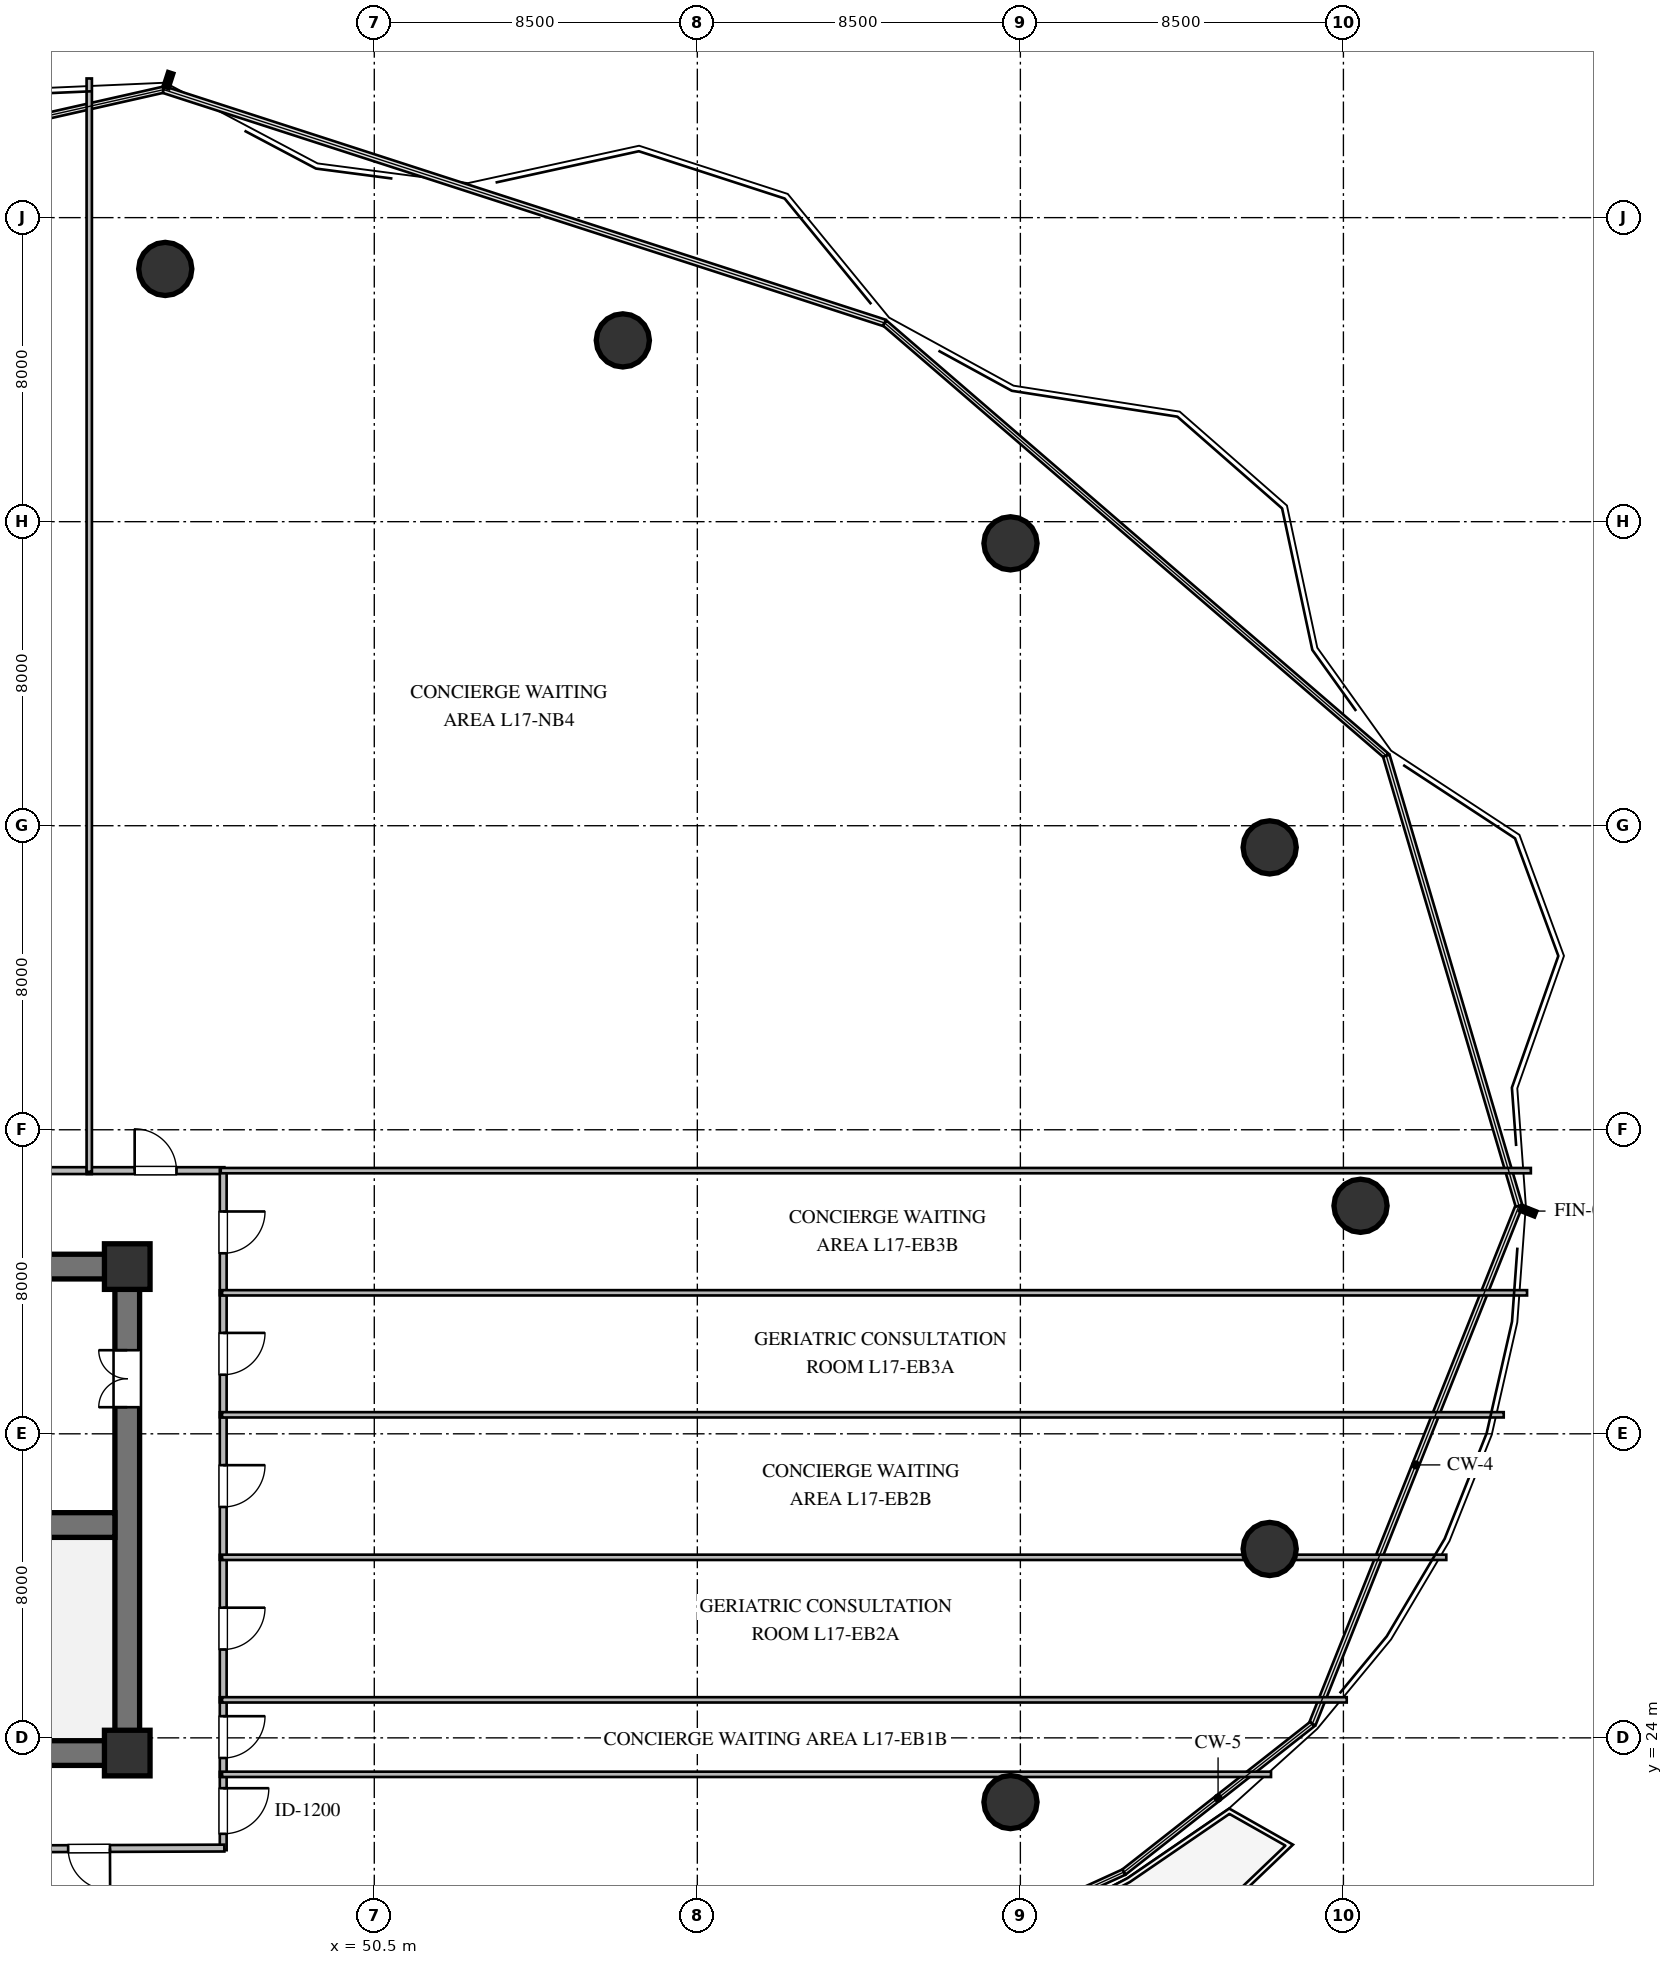
"""IFC4 building model, lengths in metres.
Left out: names, types, materials, properties, quantities, classifications, styles, units other than length and angle.
Written with IfcOpenShell. Run it as: python <this file> out.ifc"""

import sys

from ifc_helpers import new_model, si_unit, direction, frame, frame_2d, origin, origin_2d, place, context, subcontext, project, spatial, rectangle, circle, extrude, element, fill, save


model = new_model("IFC4")
c1 = context("Model", 3, precision=1e-05, world=origin(), true_north=direction((0.0, 1.0)))
c2 = subcontext(c1, "Body", "Model", "MODEL_VIEW")
j1 = project(units=[si_unit("LENGTHUNIT", "METRE"), si_unit("PLANEANGLEUNIT", "RADIAN")], contexts=[c1])
p1 = place(None, origin())
s1 = spatial("IfcSite", under=j1, at=p1, CompositionType="ELEMENT")
p2 = place(p1, origin())
s2 = spatial("IfcBuilding", under=s1, at=p2, CompositionType="ELEMENT")
p3 = place(p2, frame((0.0, 0.0, 67.2)))
s3 = spatial("IfcBuildingStorey", under=s2, at=p3, CompositionType="ELEMENT", Elevation=67.2)
for number, where, z_axis, x_axis in (
    (1, (21.675, 23.6, 0.0), (0.0, 0.0, 1.0), (1.0, 0.0, 0.0)),
    (2, (21.675, 36.4, 0.0), (0.0, 0.0, 1.0), (1.0, 0.0, 0.0)),
):
    element("IfcWall", number, at=place(p3, frame(where, z_axis=z_axis, x_axis=x_axis)), inside=s3, PredefinedType="SHEAR", context=c2, shape_type="SweptSolid", body=[
        extrude(rectangle(XDim=22.65, YDim=0.65, at=frame_2d((11.325, 0.0))), origin(), (0.0, 0.0, 1.0), 3.36),
    ])
p4 = place(p3, frame((44.0, 23.925, 0.0), z_axis=(0.0, 0.0, 1.0), x_axis=(0.0, 1.0, 0.0)))
e3 = element("IfcWall", 3, at=p4, inside=s3, PredefinedType="SHEAR", context=c2, shape_type="SweptSolid", body=[
    extrude(rectangle(XDim=12.15, YDim=0.65, at=frame_2d((6.075, 0.0))), origin(), (0.0, 0.0, 1.0), 3.36),
])
p5 = place(p4, frame((8.775, 0.0, 0.0)))
e4 = element("IfcOpeningElement", 4, at=p5, cuts=e3, PredefinedType="OPENING", context=c2, shape_type="SweptSolid", body=[
    extrude(rectangle(XDim=1.5, YDim=2.15, at=frame_2d((0.75, 1.075))), frame((0.0, 0.335, 0.0), z_axis=(0.0, -1.0, 0.0), x_axis=(1.0, 0.0, 0.0)), (0.0, 0.0, 1.0), 0.67),
])
p6 = place(p3, frame((22.325, 29.6, 0.0), z_axis=(0.0, 0.0, 1.0), x_axis=(1.0, 0.0, 0.0)))
e5 = element("IfcWall", 5, at=p6, inside=s3, PredefinedType="SHEAR", context=c2, shape_type="SweptSolid", body=[
    extrude(rectangle(XDim=21.35, YDim=0.65, at=frame_2d((10.675, 0.0))), origin(), (0.0, 0.0, 1.0), 3.36),
])
p7 = place(p6, frame((12.125, 0.0, 0.0)))
e6 = element("IfcOpeningElement", 6, at=p7, cuts=e5, PredefinedType="OPENING", context=c2, shape_type="SweptSolid", body=[
    extrude(rectangle(XDim=1.15, YDim=2.1, at=frame_2d((0.575, 1.05))), frame((0.0, 0.335, 0.0), z_axis=(0.0, -1.0, 0.0), x_axis=(1.0, 0.0, 0.0)), (0.0, 0.0, 1.0), 0.67),
])
for number, where, z_axis, x_axis in (
    (7, (44.0, 23.6, 0.0), (0.0, 0.0, 1.0), (1.0, 0.0, 0.0)),
    (8, (44.0, 36.4, 0.0), (0.0, 0.0, 1.0), (1.0, 0.0, 0.0)),
):
    element("IfcColumn", number, at=place(p3, frame(where, z_axis=z_axis, x_axis=x_axis)), inside=s3, PredefinedType="COLUMN", context=c2, shape_type="SweptSolid", body=[
        extrude(rectangle(XDim=1.2, YDim=1.2, at=origin_2d()), origin(), (0.0, 0.0, 1.0), 3.6),
    ])
for number, where, z_axis, x_axis in (
    (9, (76.45, 38.0, 0.0), (0.0, 0.0, 1.0), (1.0, 0.0, 0.0)),
    (10, (74.06, 47.43, 0.0), (0.0, 0.0, 1.0), (1.0, 0.0, 0.0)),
    (11, (67.24, 55.43, 0.0), (0.0, 0.0, 1.0), (1.0, 0.0, 0.0)),
    (12, (57.04, 60.77, 0.0), (0.0, 0.0, 1.0), (1.0, 0.0, 0.0)),
    (13, (45.0, 62.65, 0.0), (0.0, 0.0, 1.0), (1.0, 0.0, 0.0)),
    (14, (67.24, 22.31, 0.0), (0.0, 0.0, 1.0), (1.0, 0.0, 0.0)),
    (15, (74.06, 28.97, 0.0), (0.0, 0.0, 1.0), (1.0, 0.0, 0.0)),
):
    element("IfcColumn", number, at=place(p3, frame(where, z_axis=z_axis, x_axis=x_axis)), inside=s3, PredefinedType="COLUMN", context=c2, shape_type="SweptSolid", body=[
        extrude(circle(Radius=0.7, at=origin_2d()), origin(), (0.0, 0.0, 1.0), 3.6),
    ])
p8 = place(p3, frame((37.935, 38.925, 0.0), z_axis=(0.0, 0.0, 1.0), x_axis=(1.0, 0.0, 0.0)))
e16 = element("IfcWall", 16, at=p8, inside=s3, PredefinedType="PARTITIONING", context=c2, shape_type="SweptSolid", body=[
    extrude(rectangle(XDim=5.13, YDim=0.18, at=frame_2d((2.565, 0.0))), origin(), (0.0, 0.0, 1.0), 3.36),
])
p9 = place(p8, frame((2.015, 0.0, 0.0)))
e17 = element("IfcOpeningElement", 17, at=p9, cuts=e16, PredefinedType="OPENING", context=c2, shape_type="SweptSolid", body=[
    extrude(rectangle(XDim=1.1, YDim=2.1, at=frame_2d((0.55, 1.05))), frame((0.0, 0.1, 0.0), z_axis=(0.0, -1.0, 0.0), x_axis=(1.0, 0.0, 0.0)), (0.0, 0.0, 1.0), 0.2),
])
p10 = place(p3, frame((42.935, 38.925, 0.0), z_axis=(0.0, 0.0, 1.0), x_axis=(1.0, 0.0, 0.0)))
e18 = element("IfcWall", 18, at=p10, inside=s3, PredefinedType="PARTITIONING", context=c2, shape_type="SweptSolid", body=[
    extrude(rectangle(XDim=3.62, YDim=0.18, at=frame_2d((1.81, 0.0))), origin(), (0.0, 0.0, 1.0), 3.36),
])
p11 = place(p10, frame((1.26, 0.0, 0.0)))
e19 = element("IfcOpeningElement", 19, at=p11, cuts=e18, PredefinedType="OPENING", context=c2, shape_type="SweptSolid", body=[
    extrude(rectangle(XDim=1.1, YDim=2.1, at=frame_2d((0.55, 1.05))), frame((0.0, 0.1, 0.0), z_axis=(0.0, -1.0, 0.0), x_axis=(1.0, 0.0, 0.0)), (0.0, 0.0, 1.0), 0.2),
])
p12 = place(p3, frame((46.525, 23.105, 0.0), z_axis=(0.0, 0.0, 1.0), x_axis=(0.0, -1.0, 0.0)))
e20 = element("IfcWall", 20, at=p12, inside=s3, PredefinedType="PARTITIONING", context=c2, shape_type="SweptSolid", body=[
    extrude(rectangle(XDim=2.06, YDim=0.18, at=frame_2d((1.03, 0.0))), origin(), (0.0, 0.0, 1.0), 3.36),
])
p13 = place(p12, frame((0.43, 0.0, 0.0)))
e21 = element("IfcOpeningElement", 21, at=p13, cuts=e20, PredefinedType="OPENING", context=c2, shape_type="SweptSolid", body=[
    extrude(rectangle(XDim=1.2, YDim=2.15, at=frame_2d((0.6, 1.075))), frame((0.0, 0.1, 0.0), z_axis=(0.0, -1.0, 0.0), x_axis=(1.0, 0.0, 0.0)), (0.0, 0.0, 1.0), 0.2),
])
p14 = place(p3, frame((46.525, 25.065, 0.0), z_axis=(0.0, 0.0, 1.0), x_axis=(0.0, -1.0, 0.0)))
e22 = element("IfcWall", 22, at=p14, inside=s3, PredefinedType="PARTITIONING", context=c2, shape_type="SweptSolid", body=[
    extrude(rectangle(XDim=2.09, YDim=0.18, at=frame_2d((1.045, 0.0))), origin(), (0.0, 0.0, 1.0), 3.36),
])
p15 = place(p14, frame((0.495, 0.0, 0.0)))
e23 = element("IfcOpeningElement", 23, at=p15, cuts=e22, PredefinedType="OPENING", context=c2, shape_type="SweptSolid", body=[
    extrude(rectangle(XDim=1.1, YDim=2.1, at=frame_2d((0.55, 1.05))), frame((0.0, 0.1, 0.0), z_axis=(0.0, -1.0, 0.0), x_axis=(1.0, 0.0, 0.0)), (0.0, 0.0, 1.0), 0.2),
])
p16 = place(p3, frame((46.525, 28.815, 0.0), z_axis=(0.0, 0.0, 1.0), x_axis=(0.0, -1.0, 0.0)))
e24 = element("IfcWall", 24, at=p16, inside=s3, PredefinedType="PARTITIONING", context=c2, shape_type="SweptSolid", body=[
    extrude(rectangle(XDim=3.88, YDim=0.18, at=frame_2d((1.94, 0.0))), origin(), (0.0, 0.0, 1.0), 3.36),
])
p17 = place(p16, frame((1.39, 0.0, 0.0)))
e25 = element("IfcOpeningElement", 25, at=p17, cuts=e24, PredefinedType="OPENING", context=c2, shape_type="SweptSolid", body=[
    extrude(rectangle(XDim=1.1, YDim=2.1, at=frame_2d((0.55, 1.05))), frame((0.0, 0.1, 0.0), z_axis=(0.0, -1.0, 0.0), x_axis=(1.0, 0.0, 0.0)), (0.0, 0.0, 1.0), 0.2),
])
p18 = place(p3, frame((46.525, 32.565, 0.0), z_axis=(0.0, 0.0, 1.0), x_axis=(0.0, -1.0, 0.0)))
e26 = element("IfcWall", 26, at=p18, inside=s3, PredefinedType="PARTITIONING", context=c2, shape_type="SweptSolid", body=[
    extrude(rectangle(XDim=3.88, YDim=0.18, at=frame_2d((1.94, 0.0))), origin(), (0.0, 0.0, 1.0), 3.36),
])
p19 = place(p18, frame((1.39, 0.0, 0.0)))
e27 = element("IfcOpeningElement", 27, at=p19, cuts=e26, PredefinedType="OPENING", context=c2, shape_type="SweptSolid", body=[
    extrude(rectangle(XDim=1.1, YDim=2.1, at=frame_2d((0.55, 1.05))), frame((0.0, 0.1, 0.0), z_axis=(0.0, -1.0, 0.0), x_axis=(1.0, 0.0, 0.0)), (0.0, 0.0, 1.0), 0.2),
])
p20 = place(p3, frame((46.525, 35.775, 0.0), z_axis=(0.0, 0.0, 1.0), x_axis=(0.0, -1.0, 0.0)))
e28 = element("IfcWall", 28, at=p20, inside=s3, PredefinedType="PARTITIONING", context=c2, shape_type="SweptSolid", body=[
    extrude(rectangle(XDim=3.34, YDim=0.18, at=frame_2d((1.67, 0.0))), origin(), (0.0, 0.0, 1.0), 3.36),
])
p21 = place(p20, frame((1.12, 0.0, 0.0)))
e29 = element("IfcOpeningElement", 29, at=p21, cuts=e28, PredefinedType="OPENING", context=c2, shape_type="SweptSolid", body=[
    extrude(rectangle(XDim=1.1, YDim=2.1, at=frame_2d((0.55, 1.05))), frame((0.0, 0.1, 0.0), z_axis=(0.0, -1.0, 0.0), x_axis=(1.0, 0.0, 0.0)), (0.0, 0.0, 1.0), 0.2),
])
p22 = place(p3, frame((46.525, 38.955, 0.0), z_axis=(0.0, 0.0, 1.0), x_axis=(0.0, -1.0, 0.0)))
e30 = element("IfcWall", 30, at=p22, inside=s3, PredefinedType="PARTITIONING", context=c2, shape_type="SweptSolid", body=[
    extrude(rectangle(XDim=3.31, YDim=0.18, at=frame_2d((1.655, 0.0))), origin(), (0.0, 0.0, 1.0), 3.36),
])
p23 = place(p22, frame((1.105, 0.0, 0.0)))
e31 = element("IfcOpeningElement", 31, at=p23, cuts=e30, PredefinedType="OPENING", context=c2, shape_type="SweptSolid", body=[
    extrude(rectangle(XDim=1.1, YDim=2.1, at=frame_2d((0.55, 1.05))), frame((0.0, 0.1, 0.0), z_axis=(0.0, -1.0, 0.0), x_axis=(1.0, 0.0, 0.0)), (0.0, 0.0, 1.0), 0.2),
])
p24 = place(p3, frame((46.555, 21.1, 0.0), z_axis=(0.0, 0.0, 1.0), x_axis=(-0.999993762996, -0.00353185055, 0.0)))
e32 = element("IfcWall", 32, at=p24, inside=s3, PredefinedType="PARTITIONING", context=c2, shape_type="SweptSolid", body=[
    extrude(rectangle(XDim=7.12, YDim=0.18, at=frame_2d((3.56, 0.0))), origin(), (0.0, 0.0, 1.0), 3.36),
])
p25 = place(p24, frame((3.01, 0.0, 0.0)))
e33 = element("IfcOpeningElement", 33, at=p25, cuts=e32, PredefinedType="OPENING", context=c2, shape_type="SweptSolid", body=[
    extrude(rectangle(XDim=1.1, YDim=2.1, at=frame_2d((0.55, 1.05))), frame((0.0, 0.1, 0.0), z_axis=(0.0, -1.0, 0.0), x_axis=(1.0, 0.0, 0.0)), (0.0, 0.0, 1.0), 0.2),
])
p26 = place(p3, frame((43.0, 67.662, 0.0), z_axis=(0.0, 0.0, 1.0), x_axis=(0.0, -1.0, 0.0)))
e34 = element("IfcWall", 34, at=p26, inside=s3, PredefinedType="PARTITIONING", context=c2, shape_type="SweptSolid", body=[
    extrude(rectangle(XDim=28.767, YDim=0.14, at=frame_2d((14.384, 0.0))), origin(), (0.0, 0.0, 1.0), 3.36),
])
p27 = place(p3, frame((80.932, 38.925, 0.0), z_axis=(0.0, 0.0, 1.0), x_axis=(-1.0, 0.0, 0.0)))
e35 = element("IfcWall", 35, at=p27, inside=s3, PredefinedType="PARTITIONING", context=c2, shape_type="SweptSolid", body=[
    extrude(rectangle(XDim=34.472, YDim=0.14, at=frame_2d((17.236, 0.0))), origin(), (0.0, 0.0, 1.0), 3.36),
])
p28 = place(p3, frame((46.495, 23.04, 0.0), z_axis=(0.0, 0.0, 1.0), x_axis=(1.0, 0.0, 0.0)))
e36 = element("IfcWall", 36, at=p28, inside=s3, PredefinedType="PARTITIONING", context=c2, shape_type="SweptSolid", body=[
    extrude(rectangle(XDim=27.6, YDim=0.14, at=frame_2d((13.8, 0.0))), origin(), (0.0, 0.0, 1.0), 2.89),
])
p29 = place(p3, frame((46.495, 25.0, 0.0), z_axis=(0.0, 0.0, 1.0), x_axis=(1.0, 0.0, 0.0)))
e37 = element("IfcWall", 37, at=p29, inside=s3, PredefinedType="PARTITIONING", context=c2, shape_type="SweptSolid", body=[
    extrude(rectangle(XDim=29.592, YDim=0.14, at=frame_2d((14.796, 0.0))), origin(), (0.0, 0.0, 1.0), 2.89),
])
p30 = place(p3, frame((46.495, 28.75, 0.0), z_axis=(0.0, 0.0, 1.0), x_axis=(1.0, 0.0, 0.0)))
e38 = element("IfcWall", 38, at=p30, inside=s3, PredefinedType="PARTITIONING", context=c2, shape_type="SweptSolid", body=[
    extrude(rectangle(XDim=32.212, YDim=0.14, at=frame_2d((16.106, 0.0))), origin(), (0.0, 0.0, 1.0), 2.89),
])
p31 = place(p3, frame((46.495, 32.5, 0.0), z_axis=(0.0, 0.0, 1.0), x_axis=(1.0, 0.0, 0.0)))
e39 = element("IfcWall", 39, at=p31, inside=s3, PredefinedType="PARTITIONING", context=c2, shape_type="SweptSolid", body=[
    extrude(rectangle(XDim=33.723, YDim=0.14, at=frame_2d((16.861, 0.0))), origin(), (0.0, 0.0, 1.0), 3.36),
])
p32 = place(p3, frame((46.495, 35.71, 0.0), z_axis=(0.0, 0.0, 1.0), x_axis=(1.0, 0.0, 0.0)))
e40 = element("IfcWall", 40, at=p32, inside=s3, PredefinedType="PARTITIONING", context=c2, shape_type="SweptSolid", body=[
    extrude(rectangle(XDim=34.337, YDim=0.14, at=frame_2d((17.168, 0.0))), origin(), (0.0, 0.0, 1.0), 3.36),
])
p33 = place(p5, origin())
e41 = element("IfcDoor", 41, at=p33, inside=s3, OperationType="DOUBLE_DOOR_SINGLE_SWING", PredefinedType="DOOR", context=c2, shape_type="SweptSolid", body=[
    extrude(rectangle(XDim=1.5, YDim=2.15, at=frame_2d((0.75, 1.075))), frame((0.0, 0.025, 0.0), z_axis=(0.0, -1.0, 0.0), x_axis=(1.0, 0.0, 0.0)), (0.0, 0.0, 1.0), 0.05),
])
fill(e4, e41)
p34 = place(p11, origin())
e42 = element("IfcDoor", 42, at=p34, inside=s3, OperationType="SINGLE_SWING_LEFT", PredefinedType="DOOR", context=c2, shape_type="SweptSolid", body=[
    extrude(rectangle(XDim=1.1, YDim=2.1, at=frame_2d((0.55, 1.05))), frame((0.0, 0.025, 0.0), z_axis=(0.0, -1.0, 0.0), x_axis=(1.0, 0.0, 0.0)), (0.0, 0.0, 1.0), 0.05),
])
fill(e19, e42)
p35 = place(p13, origin())
e43 = element("IfcDoor", 43, at=p35, inside=s3, OperationType="SINGLE_SWING_LEFT", PredefinedType="DOOR", context=c2, shape_type="SweptSolid", body=[
    extrude(rectangle(XDim=1.2, YDim=2.15, at=frame_2d((0.6, 1.075))), frame((0.0, 0.025, 0.0), z_axis=(0.0, -1.0, 0.0), x_axis=(1.0, 0.0, 0.0)), (0.0, 0.0, 1.0), 0.05),
])
fill(e21, e43)
p36 = place(p15, origin())
e44 = element("IfcDoor", 44, at=p36, inside=s3, OperationType="SINGLE_SWING_LEFT", PredefinedType="DOOR", context=c2, shape_type="SweptSolid", body=[
    extrude(rectangle(XDim=1.1, YDim=2.1, at=frame_2d((0.55, 1.05))), frame((0.0, 0.025, 0.0), z_axis=(0.0, -1.0, 0.0), x_axis=(1.0, 0.0, 0.0)), (0.0, 0.0, 1.0), 0.05),
])
fill(e23, e44)
p37 = place(p17, origin())
e45 = element("IfcDoor", 45, at=p37, inside=s3, OperationType="SINGLE_SWING_LEFT", PredefinedType="DOOR", context=c2, shape_type="SweptSolid", body=[
    extrude(rectangle(XDim=1.1, YDim=2.1, at=frame_2d((0.55, 1.05))), frame((0.0, 0.025, 0.0), z_axis=(0.0, -1.0, 0.0), x_axis=(1.0, 0.0, 0.0)), (0.0, 0.0, 1.0), 0.05),
])
fill(e25, e45)
p38 = place(p19, origin())
e46 = element("IfcDoor", 46, at=p38, inside=s3, OperationType="SINGLE_SWING_LEFT", PredefinedType="DOOR", context=c2, shape_type="SweptSolid", body=[
    extrude(rectangle(XDim=1.1, YDim=2.1, at=frame_2d((0.55, 1.05))), frame((0.0, 0.025, 0.0), z_axis=(0.0, -1.0, 0.0), x_axis=(1.0, 0.0, 0.0)), (0.0, 0.0, 1.0), 0.05),
])
fill(e27, e46)
p39 = place(p21, origin())
e47 = element("IfcDoor", 47, at=p39, inside=s3, OperationType="SINGLE_SWING_LEFT", PredefinedType="DOOR", context=c2, shape_type="SweptSolid", body=[
    extrude(rectangle(XDim=1.1, YDim=2.1, at=frame_2d((0.55, 1.05))), frame((0.0, 0.025, 0.0), z_axis=(0.0, -1.0, 0.0), x_axis=(1.0, 0.0, 0.0)), (0.0, 0.0, 1.0), 0.05),
])
fill(e29, e47)
p40 = place(p23, origin())
e48 = element("IfcDoor", 48, at=p40, inside=s3, OperationType="SINGLE_SWING_LEFT", PredefinedType="DOOR", context=c2, shape_type="SweptSolid", body=[
    extrude(rectangle(XDim=1.1, YDim=2.1, at=frame_2d((0.55, 1.05))), frame((0.0, 0.025, 0.0), z_axis=(0.0, -1.0, 0.0), x_axis=(1.0, 0.0, 0.0)), (0.0, 0.0, 1.0), 0.05),
])
fill(e31, e48)
p41 = place(p25, origin())
e49 = element("IfcDoor", 49, at=p41, inside=s3, OperationType="SINGLE_SWING_LEFT", PredefinedType="DOOR", context=c2, shape_type="SweptSolid", body=[
    extrude(rectangle(XDim=1.1, YDim=2.1, at=frame_2d((0.55, 1.05))), frame((0.0, 0.025, 0.0), z_axis=(0.0, -1.0, 0.0), x_axis=(1.0, 0.0, 0.0)), (0.0, 0.0, 1.0), 0.05),
])
fill(e33, e49)
save(model, sys.argv[1])
